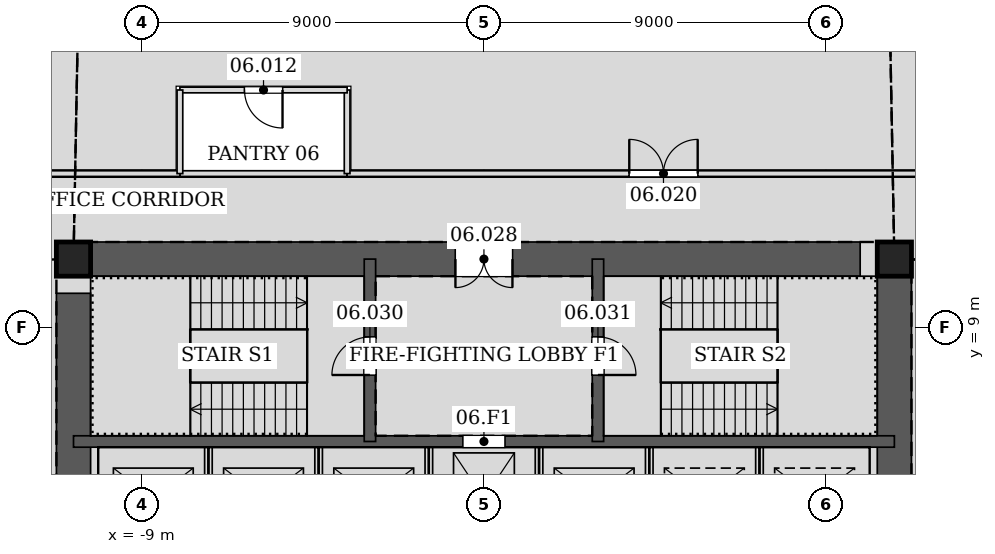
"""IFC4 building model, lengths in metres.
Left out: names, types, materials, properties, quantities, classifications, styles, units other than length and angle.
Written with IfcOpenShell. Run it as: python <this file> out.ifc"""

import sys

from ifc_helpers import new_model, si_unit, direction, frame, frame_2d, origin, origin_2d, place, context, subcontext, project, spatial, rectangle, hollow_rectangle, extrude, element, fill, save


model = new_model("IFC4")
c1 = context("Model", 3, precision=1e-05, world=origin(), true_north=direction((0.0, 1.0)))
c2 = subcontext(c1, "Body", "Model", "MODEL_VIEW")
j1 = project(units=[si_unit("LENGTHUNIT", "METRE"), si_unit("PLANEANGLEUNIT", "RADIAN")], contexts=[c1])
p1 = place(None, origin())
s1 = spatial("IfcSite", under=j1, at=p1, CompositionType="ELEMENT")
p2 = place(p1, origin())
s2 = spatial("IfcBuilding", under=s1, at=p2, CompositionType="ELEMENT")
p3 = place(p2, frame((0.0, 0.0, 33.0)))
s3 = spatial("IfcBuildingStorey", under=s2, at=p3, CompositionType="ELEMENT", Elevation=33.0)
for number, where, z_axis, x_axis in (
    (1, (10.8, 10.8, 0.0), (0.0, 0.0, 1.0), (1.0, 0.0, 0.0)),
    (2, (-10.8, 10.8, 0.0), (0.0, 0.0, 1.0), (1.0, 0.0, 0.0)),
):
    element("IfcColumn", number, at=place(p3, frame(where, z_axis=z_axis, x_axis=x_axis)), inside=s3, PredefinedType="COLUMN", context=c2, shape_type="SweptSolid", body=[
        extrude(hollow_rectangle(XDim=0.9, YDim=0.9, WallThickness=0.06, at=origin_2d()), origin(), (0.0, 0.0, 1.0), 4.2),
    ])
p4 = place(p3, frame((10.8, -10.8, 0.0), z_axis=(0.0, 0.0, 1.0), x_axis=(0.0, 1.0, 0.0)))
e3 = element("IfcWall", 3, at=p4, inside=s3, PredefinedType="SOLIDWALL", context=c2, shape_type="SweptSolid", body=[
    extrude(rectangle(XDim=21.6, YDim=0.9, at=frame_2d((10.8, 0.0))), origin(), (0.0, 0.0, 1.0), 4.2),
])
p5 = place(p4, frame((11.7, 0.0, 0.0)))
e4 = element("IfcOpeningElement", 4, at=p5, cuts=e3, PredefinedType="OPENING", context=c2, shape_type="SweptSolid", body=[
    extrude(rectangle(XDim=1.2, YDim=2.1, at=frame_2d((0.6, 1.05))), frame((0.0, 0.46, 0.0), z_axis=(0.0, -1.0, 0.0), x_axis=(1.0, 0.0, 0.0)), (0.0, 0.0, 1.0), 0.92),
])
p6 = place(p4, frame((8.7, 0.0, 0.0)))
e5 = element("IfcOpeningElement", 5, at=p6, cuts=e3, PredefinedType="OPENING", context=c2, shape_type="SweptSolid", body=[
    extrude(rectangle(XDim=1.2, YDim=2.1, at=frame_2d((0.6, 1.05))), frame((0.0, 0.46, 0.0), z_axis=(0.0, -1.0, 0.0), x_axis=(1.0, 0.0, 0.0)), (0.0, 0.0, 1.0), 0.92),
])
p7 = place(p3, frame((10.8, 10.8, 0.0), z_axis=(0.0, 0.0, 1.0), x_axis=(-1.0, 0.0, 0.0)))
e6 = element("IfcWall", 6, at=p7, inside=s3, PredefinedType="SOLIDWALL", context=c2, shape_type="SweptSolid", body=[
    extrude(rectangle(XDim=21.6, YDim=0.9, at=frame_2d((10.8, 0.0))), origin(), (0.0, 0.0, 1.0), 4.2),
])
p8 = place(p7, frame((10.05, 0.0, 0.0)))
e7 = element("IfcOpeningElement", 7, at=p8, cuts=e6, PredefinedType="OPENING", context=c2, shape_type="SweptSolid", body=[
    extrude(rectangle(XDim=1.5, YDim=2.1, at=frame_2d((0.75, 1.05))), frame((0.0, 0.46, 0.0), z_axis=(0.0, -1.0, 0.0), x_axis=(1.0, 0.0, 0.0)), (0.0, 0.0, 1.0), 0.92),
])
p9 = place(p3, frame((-10.8, 10.8, 0.0), z_axis=(0.0, 0.0, 1.0), x_axis=(0.0, -1.0, 0.0)))
e8 = element("IfcWall", 8, at=p9, inside=s3, PredefinedType="SOLIDWALL", context=c2, shape_type="SweptSolid", body=[
    extrude(rectangle(XDim=21.6, YDim=0.9, at=frame_2d((10.8, 0.0))), origin(), (0.0, 0.0, 1.0), 4.2),
])
p10 = place(p9, frame((8.7, 0.0, 0.0)))
e9 = element("IfcOpeningElement", 9, at=p10, cuts=e8, PredefinedType="OPENING", context=c2, shape_type="SweptSolid", body=[
    extrude(rectangle(XDim=1.2, YDim=2.1, at=frame_2d((0.6, 1.05))), frame((0.0, 0.46, 0.0), z_axis=(0.0, -1.0, 0.0), x_axis=(1.0, 0.0, 0.0)), (0.0, 0.0, 1.0), 0.92),
])
p11 = place(p9, frame((11.7, 0.0, 0.0)))
e10 = element("IfcOpeningElement", 10, at=p11, cuts=e8, PredefinedType="OPENING", context=c2, shape_type="SweptSolid", body=[
    extrude(rectangle(XDim=1.2, YDim=2.1, at=frame_2d((0.6, 1.05))), frame((0.0, 0.46, 0.0), z_axis=(0.0, -1.0, 0.0), x_axis=(1.0, 0.0, 0.0)), (0.0, 0.0, 1.0), 0.92),
])
p12 = place(p3, frame((-10.8, 6.0, 0.0), z_axis=(0.0, 0.0, 1.0), x_axis=(1.0, 0.0, 0.0)))
e11 = element("IfcWall", 11, at=p12, inside=s3, PredefinedType="SOLIDWALL", context=c2, shape_type="SweptSolid", body=[
    extrude(rectangle(XDim=21.6, YDim=0.3, at=frame_2d((10.8, 0.0))), origin(), (0.0, 0.0, 1.0), 4.2),
])
p13 = place(p12, frame((10.25, 0.0, 0.0)))
e12 = element("IfcOpeningElement", 12, at=p13, cuts=e11, PredefinedType="OPENING", context=c2, shape_type="SweptSolid", body=[
    extrude(rectangle(XDim=1.1, YDim=2.1, at=frame_2d((0.55, 1.05))), frame((0.0, 0.16, 0.0), z_axis=(0.0, -1.0, 0.0), x_axis=(1.0, 0.0, 0.0)), (0.0, 0.0, 1.0), 0.32),
])
p14 = place(p3, frame((-3.0, 6.0, 0.0), z_axis=(0.0, 0.0, 1.0), x_axis=(0.0, 1.0, 0.0)))
e13 = element("IfcWall", 13, at=p14, inside=s3, PredefinedType="SOLIDWALL", context=c2, shape_type="SweptSolid", body=[
    extrude(rectangle(XDim=4.8, YDim=0.3, at=frame_2d((2.4, 0.0))), origin(), (0.0, 0.0, 1.0), 4.2),
])
p15 = place(p14, frame((1.75, 0.0, 0.0)))
e14 = element("IfcOpeningElement", 14, at=p15, cuts=e13, PredefinedType="OPENING", context=c2, shape_type="SweptSolid", body=[
    extrude(rectangle(XDim=1.0, YDim=2.1, at=frame_2d((0.5, 1.05))), frame((0.0, 0.16, 0.0), z_axis=(0.0, -1.0, 0.0), x_axis=(1.0, 0.0, 0.0)), (0.0, 0.0, 1.0), 0.32),
])
p16 = place(p3, frame((3.0, 6.0, 0.0), z_axis=(0.0, 0.0, 1.0), x_axis=(0.0, 1.0, 0.0)))
e15 = element("IfcWall", 15, at=p16, inside=s3, PredefinedType="SOLIDWALL", context=c2, shape_type="SweptSolid", body=[
    extrude(rectangle(XDim=4.8, YDim=0.3, at=frame_2d((2.4, 0.0))), origin(), (0.0, 0.0, 1.0), 4.2),
])
p17 = place(p16, frame((1.75, 0.0, 0.0)))
e16 = element("IfcOpeningElement", 16, at=p17, cuts=e15, PredefinedType="OPENING", context=c2, shape_type="SweptSolid", body=[
    extrude(rectangle(XDim=1.0, YDim=2.1, at=frame_2d((0.5, 1.05))), frame((0.0, 0.16, 0.0), z_axis=(0.0, -1.0, 0.0), x_axis=(1.0, 0.0, 0.0)), (0.0, 0.0, 1.0), 0.32),
])
p18 = place(p3, frame((-3.599, 13.05, 0.0), z_axis=(0.0, 0.0, 1.0), x_axis=(-1.0, 0.0, 0.0)))
e17 = element("IfcWall", 17, at=p18, inside=s3, PredefinedType="PARTITIONING", context=c2, shape_type="SweptSolid", body=[
    extrude(rectangle(XDim=4.402, YDim=0.15, at=frame_2d((2.201, 0.0))), origin(), (0.0, 0.0, 1.0), 4.035),
])
p19 = place(p3, frame((-7.999, 13.05, 0.0), z_axis=(0.0, 0.0, 1.0), x_axis=(-1.0, 0.0, 0.0)))
e18 = element("IfcWall", 18, at=p19, inside=s3, PredefinedType="PARTITIONING", context=c2, shape_type="SweptSolid", body=[
    extrude(rectangle(XDim=5.051, YDim=0.15, at=frame_2d((2.525, 0.0))), origin(), (0.0, 0.0, 1.0), 3.065),
])
p20 = place(p3, frame((13.05, 13.05, 0.0), z_axis=(0.0, 0.0, 1.0), x_axis=(-1.0, 0.0, 0.0)))
e19 = element("IfcWall", 19, at=p20, inside=s3, PredefinedType="PARTITIONING", context=c2, shape_type="SweptSolid", body=[
    extrude(rectangle(XDim=16.651, YDim=0.15, at=frame_2d((8.326, 0.0))), origin(), (0.0, 0.0, 1.0), 2.984),
])
p21 = place(p20, frame((7.426, 0.0, 0.0)))
e20 = element("IfcOpeningElement", 20, at=p21, cuts=e19, PredefinedType="OPENING", context=c2, shape_type="SweptSolid", body=[
    extrude(rectangle(XDim=1.8, YDim=2.4, at=frame_2d((0.9, 1.2))), frame((0.0, 0.085, 0.0), z_axis=(0.0, -1.0, 0.0), x_axis=(1.0, 0.0, 0.0)), (0.0, 0.0, 1.0), 0.17),
])
p22 = place(p3, frame((-3.6, 13.05, 0.0), z_axis=(0.0, 0.0, 1.0), x_axis=(0.0, 1.0, 0.0)))
e21 = element("IfcWall", 21, at=p22, inside=s3, PredefinedType="PARTITIONING", context=c2, shape_type="SweptSolid", body=[
    extrude(rectangle(XDim=2.2, YDim=0.15, at=frame_2d((1.1, 0.0))), origin(), (0.0, 0.0, 1.0), 3.426),
])
p23 = place(p3, frame((-3.6, 15.25, 0.0), z_axis=(0.0, 0.0, 1.0), x_axis=(-1.0, 0.0, 0.0)))
e22 = element("IfcWall", 22, at=p23, inside=s3, PredefinedType="PARTITIONING", context=c2, shape_type="SweptSolid", body=[
    extrude(rectangle(XDim=4.4, YDim=0.15, at=frame_2d((2.2, 0.0))), origin(), (0.0, 0.0, 1.0), 4.035),
])
p24 = place(p23, frame((1.7, 0.0, 0.0)))
e23 = element("IfcOpeningElement", 23, at=p24, cuts=e22, PredefinedType="OPENING", context=c2, shape_type="SweptSolid", body=[
    extrude(rectangle(XDim=1.0, YDim=2.1, at=frame_2d((0.5, 1.05))), frame((0.0, 0.085, 0.0), z_axis=(0.0, -1.0, 0.0), x_axis=(1.0, 0.0, 0.0)), (0.0, 0.0, 1.0), 0.17),
])
p25 = place(p3, frame((-8.0, 15.25, 0.0), z_axis=(0.0, 0.0, 1.0), x_axis=(0.0, -1.0, 0.0)))
e24 = element("IfcWall", 24, at=p25, inside=s3, PredefinedType="PARTITIONING", context=c2, shape_type="SweptSolid", body=[
    extrude(rectangle(XDim=2.2, YDim=0.15, at=frame_2d((1.1, 0.0))), origin(), (0.0, 0.0, 1.0), 3.426),
])
for number, where, z_axis, x_axis in (
    (25, (-7.25, 3.15, 0.0), (0.0, 0.0, 1.0), (0.0, 1.0, 0.0)),
    (26, (-4.35, 3.15, 0.0), (0.0, 0.0, 1.0), (0.0, 1.0, 0.0)),
    (27, (-1.45, 3.15, 0.0), (0.0, 0.0, 1.0), (0.0, 1.0, 0.0)),
    (28, (1.45, 3.15, 0.0), (0.0, 0.0, 1.0), (0.0, 1.0, 0.0)),
    (29, (4.35, 3.15, 0.0), (0.0, 0.0, 1.0), (0.0, 1.0, 0.0)),
    (30, (7.25, 3.15, 0.0), (0.0, 0.0, 1.0), (0.0, 1.0, 0.0)),
):
    element("IfcWall", number, at=place(p3, frame(where, z_axis=z_axis, x_axis=x_axis)), inside=s3, PredefinedType="PARTITIONING", context=c2, shape_type="SweptSolid", body=[
        extrude(rectangle(XDim=2.7, YDim=0.2, at=frame_2d((1.35, 0.0))), origin(), (0.0, 0.0, 1.0), 4.2),
    ])
p26 = place(p24, origin())
e31 = element("IfcDoor", 31, at=p26, inside=s3, OperationType="SINGLE_SWING_LEFT", PredefinedType="DOOR", context=c2, shape_type="SweptSolid", body=[
    extrude(rectangle(XDim=1.0, YDim=2.1, at=frame_2d((0.5, 1.05))), frame((0.0, 0.025, 0.0), z_axis=(0.0, -1.0, 0.0), x_axis=(1.0, 0.0, 0.0)), (0.0, 0.0, 1.0), 0.05),
])
fill(e23, e31)
p27 = place(p21, frame((1.8, 0.0, 0.0), z_axis=(0.0, 0.0, 1.0), x_axis=(-1.0, 0.0, 0.0)))
e32 = element("IfcDoor", 32, at=p27, inside=s3, OperationType="DOUBLE_DOOR_SINGLE_SWING", PredefinedType="DOOR", context=c2, shape_type="SweptSolid", body=[
    extrude(rectangle(XDim=1.8, YDim=2.4, at=frame_2d((0.9, 1.2))), frame((0.0, 0.025, 0.0), z_axis=(0.0, -1.0, 0.0), x_axis=(1.0, 0.0, 0.0)), (0.0, 0.0, 1.0), 0.05),
])
fill(e20, e32)
p28 = place(p8, origin())
e33 = element("IfcDoor", 33, at=p28, inside=s3, OperationType="DOUBLE_DOOR_SINGLE_SWING", PredefinedType="DOOR", context=c2, shape_type="SweptSolid", body=[
    extrude(rectangle(XDim=1.5, YDim=2.1, at=frame_2d((0.75, 1.05))), frame((0.0, 0.025, 0.0), z_axis=(0.0, -1.0, 0.0), x_axis=(1.0, 0.0, 0.0)), (0.0, 0.0, 1.0), 0.05),
])
fill(e7, e33)
p29 = place(p15, origin())
e34 = element("IfcDoor", 34, at=p29, inside=s3, OperationType="SINGLE_SWING_LEFT", PredefinedType="DOOR", context=c2, shape_type="SweptSolid", body=[
    extrude(rectangle(XDim=1.0, YDim=2.1, at=frame_2d((0.5, 1.05))), frame((0.0, 0.025, 0.0), z_axis=(0.0, -1.0, 0.0), x_axis=(1.0, 0.0, 0.0)), (0.0, 0.0, 1.0), 0.05),
])
fill(e14, e34)
p30 = place(p17, frame((1.0, 0.0, 0.0), z_axis=(0.0, 0.0, 1.0), x_axis=(-1.0, 0.0, 0.0)))
e35 = element("IfcDoor", 35, at=p30, inside=s3, OperationType="SINGLE_SWING_RIGHT", PredefinedType="DOOR", context=c2, shape_type="SweptSolid", body=[
    extrude(rectangle(XDim=1.0, YDim=2.1, at=frame_2d((0.5, 1.05))), frame((0.0, 0.025, 0.0), z_axis=(0.0, -1.0, 0.0), x_axis=(1.0, 0.0, 0.0)), (0.0, 0.0, 1.0), 0.05),
])
fill(e16, e35)
p31 = place(p13, origin())
e36 = element("IfcDoor", 36, at=p31, inside=s3, OperationType="DOUBLE_DOOR_SLIDING", PredefinedType="DOOR", context=c2, shape_type="SweptSolid", body=[
    extrude(rectangle(XDim=1.1, YDim=2.1, at=frame_2d((0.55, 1.05))), frame((0.0, 0.025, 0.0), z_axis=(0.0, -1.0, 0.0), x_axis=(1.0, 0.0, 0.0)), (0.0, 0.0, 1.0), 0.05),
])
fill(e12, e36)
save(model, sys.argv[1])
